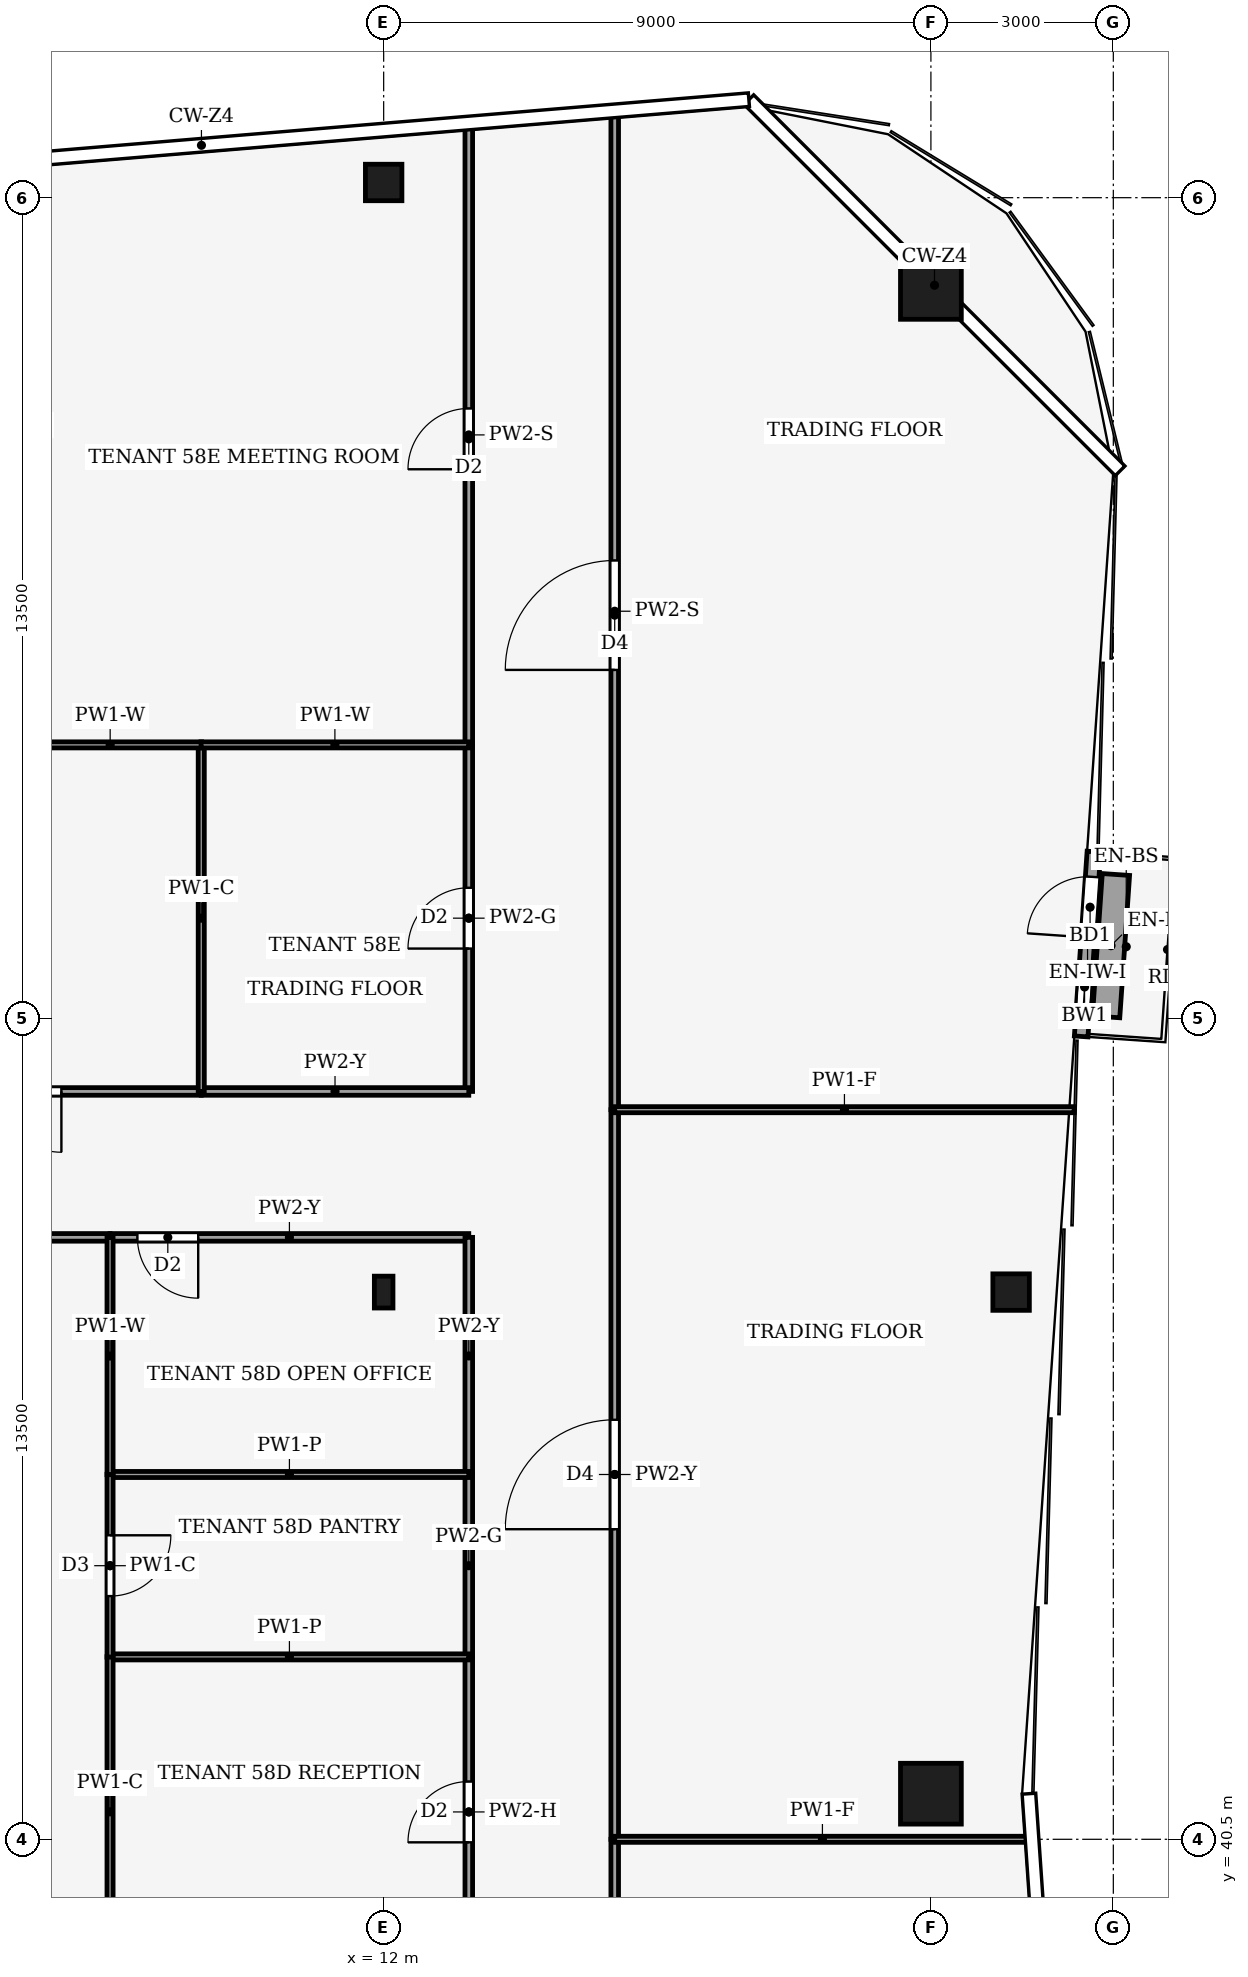
"""IFC4 building model, lengths in metres.
Left out: names, types, materials, properties, quantities, classifications, styles, units other than length and angle.
Written with IfcOpenShell. Run it as: python <this file> out.ifc"""

import sys

from ifc_helpers import new_model, si_unit, direction, frame, frame_2d, origin, origin_2d, place, context, subcontext, project, spatial, rectangle, hollow_rectangle, i_section, extrude, element, fill, save


model = new_model("IFC4")
c1 = context("Model", 3, precision=1e-05, world=origin(), true_north=direction((0.0, 1.0)))
c2 = subcontext(c1, "Body", "Model", "MODEL_VIEW")
j1 = project(units=[si_unit("LENGTHUNIT", "METRE"), si_unit("PLANEANGLEUNIT", "RADIAN")], contexts=[c1])
p1 = place(None, origin())
s1 = spatial("IfcSite", under=j1, at=p1, CompositionType="ELEMENT")
p2 = place(p1, origin())
s2 = spatial("IfcBuilding", under=s1, at=p2, CompositionType="ELEMENT")
p3 = place(p2, frame((0.0, 0.0, 254.0)))
s3 = spatial("IfcBuildingStorey", under=s2, at=p3, CompositionType="ELEMENT", Elevation=254.0)
for number, where, z_axis, x_axis in (
    (1, (21.0, 66.0, 0.0), (0.0, 0.0, 1.0), (1.0, 0.0, 0.0)),
    (2, (21.0, 41.25, 0.0), (0.0, 0.0, 1.0), (1.0, 0.0, 0.0)),
):
    element("IfcColumn", number, at=place(p3, frame(where, z_axis=z_axis, x_axis=x_axis)), inside=s3, PredefinedType="COLUMN", context=c2, shape_type="SweptSolid", body=[
        extrude(hollow_rectangle(XDim=1.0, YDim=1.0, WallThickness=0.045, at=origin_2d()), origin(), (0.0, 0.0, 1.0), 4.0),
    ])
for number, where, z_axis, x_axis in (
    (3, (12.0, 67.75, 0.0), (0.0, 0.0, 1.0), (1.0, 0.0, 0.0)),
    (4, (22.319, 49.5, 0.0), (0.0, 0.0, 1.0), (1.0, 0.0, 0.0)),
):
    element("IfcColumn", number, at=place(p3, frame(where, z_axis=z_axis, x_axis=x_axis)), inside=s3, PredefinedType="COLUMN", context=c2, shape_type="SweptSolid", body=[
        extrude(hollow_rectangle(XDim=0.6, YDim=0.6, WallThickness=0.025, at=origin_2d()), origin(), (0.0, 0.0, 1.0), 4.0),
    ])
p4 = place(p3, frame((12.0, 49.5, 0.0), z_axis=(0.0, 0.0, 1.0), x_axis=(1.0, 0.0, 0.0)))
e5 = element("IfcColumn", 5, at=p4, inside=s3, PredefinedType="COLUMN", context=c2, shape_type="SweptSolid", body=[
    extrude(i_section(OverallWidth=0.306, OverallDepth=0.524, WebThickness=0.012, FlangeThickness=0.04, FilletRadius=0.027, at=origin_2d()), origin(), (0.0, 0.0, 1.0), 4.0),
])
p5 = place(p3, frame((23.471, 53.705, 0.0), z_axis=(0.0, 0.0, 1.0), x_axis=(0.068837845086, 0.997627862023, 0.0)))
e6 = element("IfcWall", 6, at=p5, inside=s3, PredefinedType="SOLIDWALL", context=c2, shape_type="SweptSolid", body=[
    extrude(rectangle(XDim=3.047, YDim=0.224, at=frame_2d((1.523, 0.0))), origin(), (0.0, 0.0, 1.0), 3.65),
])
p6 = place(p5, frame((1.631, 0.0, 0.0)))
e7 = element("IfcOpeningElement", 7, at=p6, cuts=e6, PredefinedType="OPENING", context=c2, shape_type="SweptSolid", body=[
    extrude(rectangle(XDim=1.0, YDim=2.1, at=frame_2d((0.5, 1.05))), frame((0.0, 0.122, 0.0), z_axis=(0.0, -1.0, 0.0), x_axis=(1.0, 0.0, 0.0)), (0.0, 0.0, 1.0), 0.244),
])
p7 = place(p5, frame((0.416, 0.0, 0.9)))
e8 = element("IfcOpeningElement", 8, at=p7, cuts=e6, PredefinedType="OPENING", context=c2, shape_type="SweptSolid", body=[
    extrude(rectangle(XDim=0.8, YDim=1.2, at=frame_2d((0.4, 0.6))), frame((0.0, 0.122, 0.0), z_axis=(0.0, -1.0, 0.0), x_axis=(1.0, 0.0, 0.0)), (0.0, 0.0, 1.0), 0.244),
])
p8 = place(p3, frame((23.881, 54.027, 0.0), z_axis=(0.0, 0.0, 1.0), x_axis=(0.068769956374, 0.997632544127, 0.0)))
e9 = element("IfcWall", 9, at=p8, inside=s3, PredefinedType="USERDEFINED", context=c2, shape_type="SweptSolid", body=[
    extrude(rectangle(XDim=2.347, YDim=0.45, at=frame_2d((1.173, 0.0))), origin(), (0.0, 0.0, 1.0), 0.4),
])
p9 = place(p3, frame((15.8, 40.5, 0.0), z_axis=(0.0, 0.0, 1.0), x_axis=(0.0, -1.0, 0.0)))
e10 = element("IfcWall", 10, at=p9, inside=s3, PredefinedType="PARTITIONING", context=c2, shape_type="SweptSolid", body=[
    extrude(rectangle(XDim=12.0, YDim=0.125, at=frame_2d((6.0, 0.0))), origin(), (0.0, 0.0, 1.0), 3.14),
])
p10 = place(p9, frame((5.5, 0.0, 0.0)))
e11 = element("IfcOpeningElement", 11, at=p10, cuts=e10, PredefinedType="OPENING", context=c2, shape_type="SweptSolid", body=[
    extrude(rectangle(XDim=1.0, YDim=2.1, at=frame_2d((0.5, 1.05))), frame((0.0, 0.073, 0.0), z_axis=(0.0, -1.0, 0.0), x_axis=(1.0, 0.0, 0.0)), (0.0, 0.0, 1.0), 0.145),
])
p11 = place(p3, frame((15.8, 40.5, 0.0), z_axis=(0.0, 0.0, 1.0), x_axis=(0.0, 1.0, 0.0)))
e12 = element("IfcWall", 12, at=p11, inside=s3, PredefinedType="PARTITIONING", context=c2, shape_type="SweptSolid", body=[
    extrude(rectangle(XDim=12.0, YDim=0.125, at=frame_2d((6.0, 0.0))), origin(), (0.0, 0.0, 1.0), 3.24),
])
p12 = place(p11, frame((5.1, 0.0, 0.0)))
e13 = element("IfcOpeningElement", 13, at=p12, cuts=e12, PredefinedType="OPENING", context=c2, shape_type="SweptSolid", body=[
    extrude(rectangle(XDim=1.8, YDim=2.1, at=frame_2d((0.9, 1.05))), frame((0.0, 0.073, 0.0), z_axis=(0.0, -1.0, 0.0), x_axis=(1.0, 0.0, 0.0)), (0.0, 0.0, 1.0), 0.145),
])
p13 = place(p3, frame((15.8, 52.5, 0.0), z_axis=(0.0, 0.0, 1.0), x_axis=(0.0, 1.0, 0.0)))
e14 = element("IfcWall", 14, at=p13, inside=s3, PredefinedType="PARTITIONING", context=c2, shape_type="SweptSolid", body=[
    extrude(rectangle(XDim=16.397, YDim=0.125, at=frame_2d((8.198, 0.0))), origin(), (0.0, 0.0, 1.0), 3.04),
])
p14 = place(p13, frame((7.233, 0.0, 0.0)))
e15 = element("IfcOpeningElement", 15, at=p14, cuts=e14, PredefinedType="OPENING", context=c2, shape_type="SweptSolid", body=[
    extrude(rectangle(XDim=1.8, YDim=2.1, at=frame_2d((0.9, 1.05))), frame((0.0, 0.073, 0.0), z_axis=(0.0, -1.0, 0.0), x_axis=(1.0, 0.0, 0.0)), (0.0, 0.0, 1.0), 0.145),
])
p15 = place(p3, frame((13.4, 38.4, 0.0), z_axis=(0.0, 0.0, 1.0), x_axis=(0.0, 1.0, 0.0)))
e16 = element("IfcWall", 16, at=p15, inside=s3, PredefinedType="PARTITIONING", context=c2, shape_type="SweptSolid", body=[
    extrude(rectangle(XDim=5.1, YDim=0.125, at=frame_2d((2.55, 0.0))), origin(), (0.0, 0.0, 1.0), 3.14),
])
p16 = place(p15, frame((2.05, 0.0, 0.0)))
e17 = element("IfcOpeningElement", 17, at=p16, cuts=e16, PredefinedType="OPENING", context=c2, shape_type="SweptSolid", body=[
    extrude(rectangle(XDim=1.0, YDim=2.1, at=frame_2d((0.5, 1.05))), frame((0.0, 0.073, 0.0), z_axis=(0.0, -1.0, 0.0), x_axis=(1.0, 0.0, 0.0)), (0.0, 0.0, 1.0), 0.145),
])
p17 = place(p3, frame((13.4, 43.5, 0.0), z_axis=(0.0, 0.0, 1.0), x_axis=(0.0, 1.0, 0.0)))
e18 = element("IfcWall", 18, at=p17, inside=s3, PredefinedType="PARTITIONING", context=c2, shape_type="SweptSolid", body=[
    extrude(rectangle(XDim=3.0, YDim=0.125, at=frame_2d((1.5, 0.0))), origin(), (0.0, 0.0, 1.0), 3.87),
])
p18 = place(p3, frame((13.4, 50.4, 0.0), z_axis=(0.0, 0.0, 1.0), x_axis=(-1.0, 0.0, 0.0)))
e19 = element("IfcWall", 19, at=p18, inside=s3, PredefinedType="PARTITIONING", context=c2, shape_type="SweptSolid", body=[
    extrude(rectangle(XDim=5.9, YDim=0.125, at=frame_2d((2.95, 0.0))), origin(), (0.0, 0.0, 1.0), 3.24),
])
p19 = place(p18, frame((4.45, 0.0, 0.0)))
e20 = element("IfcOpeningElement", 20, at=p19, cuts=e19, PredefinedType="OPENING", context=c2, shape_type="SweptSolid", body=[
    extrude(rectangle(XDim=1.0, YDim=2.1, at=frame_2d((0.5, 1.05))), frame((0.0, 0.073, 0.0), z_axis=(0.0, -1.0, 0.0), x_axis=(1.0, 0.0, 0.0)), (0.0, 0.0, 1.0), 0.145),
])
p20 = place(p3, frame((13.4, 46.5, 0.0), z_axis=(0.0, 0.0, 1.0), x_axis=(0.0, 1.0, 0.0)))
e21 = element("IfcWall", 21, at=p20, inside=s3, PredefinedType="PARTITIONING", context=c2, shape_type="SweptSolid", body=[
    extrude(rectangle(XDim=3.9, YDim=0.125, at=frame_2d((1.95, 0.0))), origin(), (0.0, 0.0, 1.0), 3.24),
])
p21 = place(p3, frame((7.5, 50.4, 0.0), z_axis=(0.0, 0.0, 1.0), x_axis=(-1.0, 0.0, 0.0)))
e22 = element("IfcWall", 22, at=p21, inside=s3, PredefinedType="PARTITIONING", context=c2, shape_type="SweptSolid", body=[
    extrude(rectangle(XDim=7.5, YDim=0.125, at=frame_2d((3.75, 0.0))), origin(), (0.0, 0.0, 1.0), 3.24),
])
p22 = place(p21, frame((2.85, 0.0, 0.0)))
e23 = element("IfcOpeningElement", 23, at=p22, cuts=e22, PredefinedType="OPENING", context=c2, shape_type="SweptSolid", body=[
    extrude(rectangle(XDim=1.0, YDim=2.1, at=frame_2d((0.5, 1.05))), frame((0.0, 0.073, 0.0), z_axis=(0.0, -1.0, 0.0), x_axis=(1.0, 0.0, 0.0)), (0.0, 0.0, 1.0), 0.145),
])
p23 = place(p3, frame((9.0, 52.8, 0.0), z_axis=(0.0, 0.0, 1.0), x_axis=(-1.0, 0.0, 0.0)))
e24 = element("IfcWall", 24, at=p23, inside=s3, PredefinedType="PARTITIONING", context=c2, shape_type="SweptSolid", body=[
    extrude(rectangle(XDim=12.0, YDim=0.125, at=frame_2d((6.0, 0.0))), origin(), (0.0, 0.0, 1.0), 3.24),
])
p24 = place(p23, frame((2.3, 0.0, 0.0)))
e25 = element("IfcOpeningElement", 25, at=p24, cuts=e24, PredefinedType="OPENING", context=c2, shape_type="SweptSolid", body=[
    extrude(rectangle(XDim=1.0, YDim=2.1, at=frame_2d((0.5, 1.05))), frame((0.0, 0.073, 0.0), z_axis=(0.0, -1.0, 0.0), x_axis=(1.0, 0.0, 0.0)), (0.0, 0.0, 1.0), 0.145),
])
p25 = place(p3, frame((13.4, 52.8, 0.0), z_axis=(0.0, 0.0, 1.0), x_axis=(0.0, 1.0, 0.0)))
e26 = element("IfcWall", 26, at=p25, inside=s3, PredefinedType="PARTITIONING", context=c2, shape_type="SweptSolid", body=[
    extrude(rectangle(XDim=5.7, YDim=0.125, at=frame_2d((2.85, 0.0))), origin(), (0.0, 0.0, 1.0), 3.87),
])
p26 = place(p25, frame((2.35, 0.0, 0.0)))
e27 = element("IfcOpeningElement", 27, at=p26, cuts=e26, PredefinedType="OPENING", context=c2, shape_type="SweptSolid", body=[
    extrude(rectangle(XDim=1.0, YDim=2.1, at=frame_2d((0.5, 1.05))), frame((0.0, 0.073, 0.0), z_axis=(0.0, -1.0, 0.0), x_axis=(1.0, 0.0, 0.0)), (0.0, 0.0, 1.0), 0.145),
])
p27 = place(p3, frame((13.4, 52.8, 0.0), z_axis=(0.0, 0.0, 1.0), x_axis=(-1.0, 0.0, 0.0)))
e28 = element("IfcWall", 28, at=p27, inside=s3, PredefinedType="PARTITIONING", context=c2, shape_type="SweptSolid", body=[
    extrude(rectangle(XDim=4.4, YDim=0.125, at=frame_2d((2.2, 0.0))), origin(), (0.0, 0.0, 1.0), 3.24),
])
p28 = place(p3, frame((13.4, 58.5, 0.0), z_axis=(0.0, 0.0, 1.0), x_axis=(0.0, 1.0, 0.0)))
e29 = element("IfcWall", 29, at=p28, inside=s3, PredefinedType="PARTITIONING", context=c2, shape_type="SweptSolid", body=[
    extrude(rectangle(XDim=10.197, YDim=0.125, at=frame_2d((5.098, 0.0))), origin(), (0.0, 0.0, 1.0), 3.04),
])
p29 = place(p28, frame((4.533, 0.0, 0.0)))
e30 = element("IfcOpeningElement", 30, at=p29, cuts=e29, PredefinedType="OPENING", context=c2, shape_type="SweptSolid", body=[
    extrude(rectangle(XDim=1.0, YDim=2.1, at=frame_2d((0.5, 1.05))), frame((0.0, 0.073, 0.0), z_axis=(0.0, -1.0, 0.0), x_axis=(1.0, 0.0, 0.0)), (0.0, 0.0, 1.0), 0.145),
])
p30 = place(p3, frame((22.632, 40.5, 0.0), z_axis=(0.0, 0.0, 1.0), x_axis=(-1.0, 0.0, 0.0)))
e31 = element("IfcWall", 31, at=p30, inside=s3, PredefinedType="PARTITIONING", context=c2, shape_type="SweptSolid", body=[
    extrude(rectangle(XDim=6.832, YDim=0.1, at=frame_2d((3.416, 0.0))), origin(), (0.0, 0.0, 1.0), 3.04),
])
p31 = place(p3, frame((23.356, 52.5, 0.0), z_axis=(0.0, 0.0, 1.0), x_axis=(-1.0, 0.0, 0.0)))
e32 = element("IfcWall", 32, at=p31, inside=s3, PredefinedType="PARTITIONING", context=c2, shape_type="SweptSolid", body=[
    extrude(rectangle(XDim=7.556, YDim=0.1, at=frame_2d((3.778, 0.0))), origin(), (0.0, 0.0, 1.0), 3.04),
])
p32 = place(p3, frame((13.4, 43.5, 0.0), z_axis=(0.0, 0.0, 1.0), x_axis=(-1.0, 0.0, 0.0)))
e33 = element("IfcWall", 33, at=p32, inside=s3, PredefinedType="PARTITIONING", context=c2, shape_type="SweptSolid", body=[
    extrude(rectangle(XDim=5.9, YDim=0.1, at=frame_2d((2.95, 0.0))), origin(), (0.0, 0.0, 1.0), 3.44),
])
p33 = place(p3, frame((7.5, 43.504, 0.0), z_axis=(0.0, 0.0, 1.0), x_axis=(0.0, -1.0, 0.0)))
e34 = element("IfcWall", 34, at=p33, inside=s3, PredefinedType="PARTITIONING", context=c2, shape_type="SweptSolid", body=[
    extrude(rectangle(XDim=5.104, YDim=0.1, at=frame_2d((2.552, 0.0))), origin(), (0.0, 0.0, 1.0), 3.87),
])
p34 = place(p3, frame((13.4, 46.5, 0.0), z_axis=(0.0, 0.0, 1.0), x_axis=(-1.0, 0.0, 0.0)))
e35 = element("IfcWall", 35, at=p34, inside=s3, PredefinedType="PARTITIONING", context=c2, shape_type="SweptSolid", body=[
    extrude(rectangle(XDim=5.9, YDim=0.1, at=frame_2d((2.95, 0.0))), origin(), (0.0, 0.0, 1.0), 3.44),
])
p35 = place(p3, frame((7.5, 46.504, 0.0), z_axis=(0.0, 0.0, 1.0), x_axis=(0.0, -1.0, 0.0)))
e36 = element("IfcWall", 36, at=p35, inside=s3, PredefinedType="PARTITIONING", context=c2, shape_type="SweptSolid", body=[
    extrude(rectangle(XDim=3.008, YDim=0.1, at=frame_2d((1.504, 0.0))), origin(), (0.0, 0.0, 1.0), 3.87),
])
p36 = place(p35, frame((1.004, 0.0, 0.0)))
e37 = element("IfcOpeningElement", 37, at=p36, cuts=e36, PredefinedType="OPENING", context=c2, shape_type="SweptSolid", body=[
    extrude(rectangle(XDim=1.0, YDim=2.1, at=frame_2d((0.5, 1.05))), frame((0.0, 0.06, 0.0), z_axis=(0.0, -1.0, 0.0), x_axis=(1.0, 0.0, 0.0)), (0.0, 0.0, 1.0), 0.12),
])
p37 = place(p3, frame((7.5, 50.4, 0.0), z_axis=(0.0, 0.0, 1.0), x_axis=(0.0, -1.0, 0.0)))
e38 = element("IfcWall", 38, at=p37, inside=s3, PredefinedType="PARTITIONING", context=c2, shape_type="SweptSolid", body=[
    extrude(rectangle(XDim=3.904, YDim=0.1, at=frame_2d((1.952, 0.0))), origin(), (0.0, 0.0, 1.0), 3.24),
])
p38 = place(p3, frame((9.0, 52.8, 0.0), z_axis=(0.0, 0.0, 1.0), x_axis=(0.0, 1.0, 0.0)))
e39 = element("IfcWall", 39, at=p38, inside=s3, PredefinedType="PARTITIONING", context=c2, shape_type="SweptSolid", body=[
    extrude(rectangle(XDim=5.7, YDim=0.1, at=frame_2d((2.85, 0.0))), origin(), (0.0, 0.0, 1.0), 3.87),
])
p39 = place(p3, frame((9.004, 58.5, 0.0), z_axis=(0.0, 0.0, 1.0), x_axis=(-1.0, 0.0, 0.0)))
e40 = element("IfcWall", 40, at=p39, inside=s3, PredefinedType="PARTITIONING", context=c2, shape_type="SweptSolid", body=[
    extrude(rectangle(XDim=3.004, YDim=0.1, at=frame_2d((1.502, 0.0))), origin(), (0.0, 0.0, 1.0), 3.24),
])
p40 = place(p3, frame((13.4, 58.5, 0.0), z_axis=(0.0, 0.0, 1.0), x_axis=(-1.0, 0.0, 0.0)))
e41 = element("IfcWall", 41, at=p40, inside=s3, PredefinedType="PARTITIONING", context=c2, shape_type="SweptSolid", body=[
    extrude(rectangle(XDim=4.404, YDim=0.1, at=frame_2d((2.202, 0.0))), origin(), (0.0, 0.0, 1.0), 3.24),
])
p41 = place(p6, origin())
e42 = element("IfcDoor", 42, at=p41, inside=s3, OperationType="SINGLE_SWING_RIGHT", PredefinedType="DOOR", context=c2, shape_type="SweptSolid", body=[
    extrude(rectangle(XDim=1.0, YDim=2.1, at=frame_2d((0.5, 1.05))), frame((0.0, 0.025, 0.0), z_axis=(0.0, -1.0, 0.0), x_axis=(1.0, 0.0, 0.0)), (0.0, 0.0, 1.0), 0.05),
])
fill(e7, e42)
p42 = place(p7, origin())
e43 = element("IfcWindow", 43, at=p42, inside=s3, PartitioningType="SINGLE_PANEL", PredefinedType="WINDOW", context=c2, shape_type="SweptSolid", body=[
    extrude(rectangle(XDim=0.8, YDim=1.2, at=frame_2d((0.4, 0.6))), frame((0.0, 0.03, 0.0), z_axis=(0.0, -1.0, 0.0), x_axis=(1.0, 0.0, 0.0)), (0.0, 0.0, 1.0), 0.06),
])
fill(e8, e43)
p43 = place(p12, origin())
e44 = element("IfcDoor", 44, at=p43, inside=s3, OperationType="DOUBLE_DOOR_SINGLE_SWING", PredefinedType="DOOR", context=c2, shape_type="SweptSolid", body=[
    extrude(rectangle(XDim=1.8, YDim=2.1, at=frame_2d((0.9, 1.05))), frame((0.0, 0.025, 0.0), z_axis=(0.0, -1.0, 0.0), x_axis=(1.0, 0.0, 0.0)), (0.0, 0.0, 1.0), 0.05),
])
fill(e13, e44)
p44 = place(p14, origin())
e45 = element("IfcDoor", 45, at=p44, inside=s3, OperationType="DOUBLE_DOOR_SINGLE_SWING", PredefinedType="DOOR", context=c2, shape_type="SweptSolid", body=[
    extrude(rectangle(XDim=1.8, YDim=2.1, at=frame_2d((0.9, 1.05))), frame((0.0, 0.025, 0.0), z_axis=(0.0, -1.0, 0.0), x_axis=(1.0, 0.0, 0.0)), (0.0, 0.0, 1.0), 0.05),
])
fill(e15, e45)
p45 = place(p16, origin())
e46 = element("IfcDoor", 46, at=p45, inside=s3, OperationType="SINGLE_SWING_LEFT", PredefinedType="DOOR", context=c2, shape_type="SweptSolid", body=[
    extrude(rectangle(XDim=1.0, YDim=2.1, at=frame_2d((0.5, 1.05))), frame((0.0, 0.025, 0.0), z_axis=(0.0, -1.0, 0.0), x_axis=(1.0, 0.0, 0.0)), (0.0, 0.0, 1.0), 0.05),
])
fill(e17, e46)
p46 = place(p19, origin())
e47 = element("IfcDoor", 47, at=p46, inside=s3, OperationType="SINGLE_SWING_RIGHT", PredefinedType="DOOR", context=c2, shape_type="SweptSolid", body=[
    extrude(rectangle(XDim=1.0, YDim=2.1, at=frame_2d((0.5, 1.05))), frame((0.0, 0.025, 0.0), z_axis=(0.0, -1.0, 0.0), x_axis=(1.0, 0.0, 0.0)), (0.0, 0.0, 1.0), 0.05),
])
fill(e20, e47)
p47 = place(p24, origin())
e48 = element("IfcDoor", 48, at=p47, inside=s3, OperationType="SINGLE_SWING_LEFT", PredefinedType="DOOR", context=c2, shape_type="SweptSolid", body=[
    extrude(rectangle(XDim=1.0, YDim=2.1, at=frame_2d((0.5, 1.05))), frame((0.0, 0.025, 0.0), z_axis=(0.0, -1.0, 0.0), x_axis=(1.0, 0.0, 0.0)), (0.0, 0.0, 1.0), 0.05),
])
fill(e25, e48)
p48 = place(p26, origin())
e49 = element("IfcDoor", 49, at=p48, inside=s3, OperationType="SINGLE_SWING_RIGHT", PredefinedType="DOOR", context=c2, shape_type="SweptSolid", body=[
    extrude(rectangle(XDim=1.0, YDim=2.1, at=frame_2d((0.5, 1.05))), frame((0.0, 0.025, 0.0), z_axis=(0.0, -1.0, 0.0), x_axis=(1.0, 0.0, 0.0)), (0.0, 0.0, 1.0), 0.05),
])
fill(e27, e49)
p49 = place(p29, origin())
e50 = element("IfcDoor", 50, at=p49, inside=s3, OperationType="SINGLE_SWING_LEFT", PredefinedType="DOOR", context=c2, shape_type="SweptSolid", body=[
    extrude(rectangle(XDim=1.0, YDim=2.1, at=frame_2d((0.5, 1.05))), frame((0.0, 0.025, 0.0), z_axis=(0.0, -1.0, 0.0), x_axis=(1.0, 0.0, 0.0)), (0.0, 0.0, 1.0), 0.05),
])
fill(e30, e50)
p50 = place(p36, origin())
e51 = element("IfcDoor", 51, at=p50, inside=s3, OperationType="SINGLE_SWING_LEFT", PredefinedType="DOOR", context=c2, shape_type="SweptSolid", body=[
    extrude(rectangle(XDim=1.0, YDim=2.1, at=frame_2d((0.5, 1.05))), frame((0.0, 0.025, 0.0), z_axis=(0.0, -1.0, 0.0), x_axis=(1.0, 0.0, 0.0)), (0.0, 0.0, 1.0), 0.05),
])
fill(e37, e51)
save(model, sys.argv[1])
